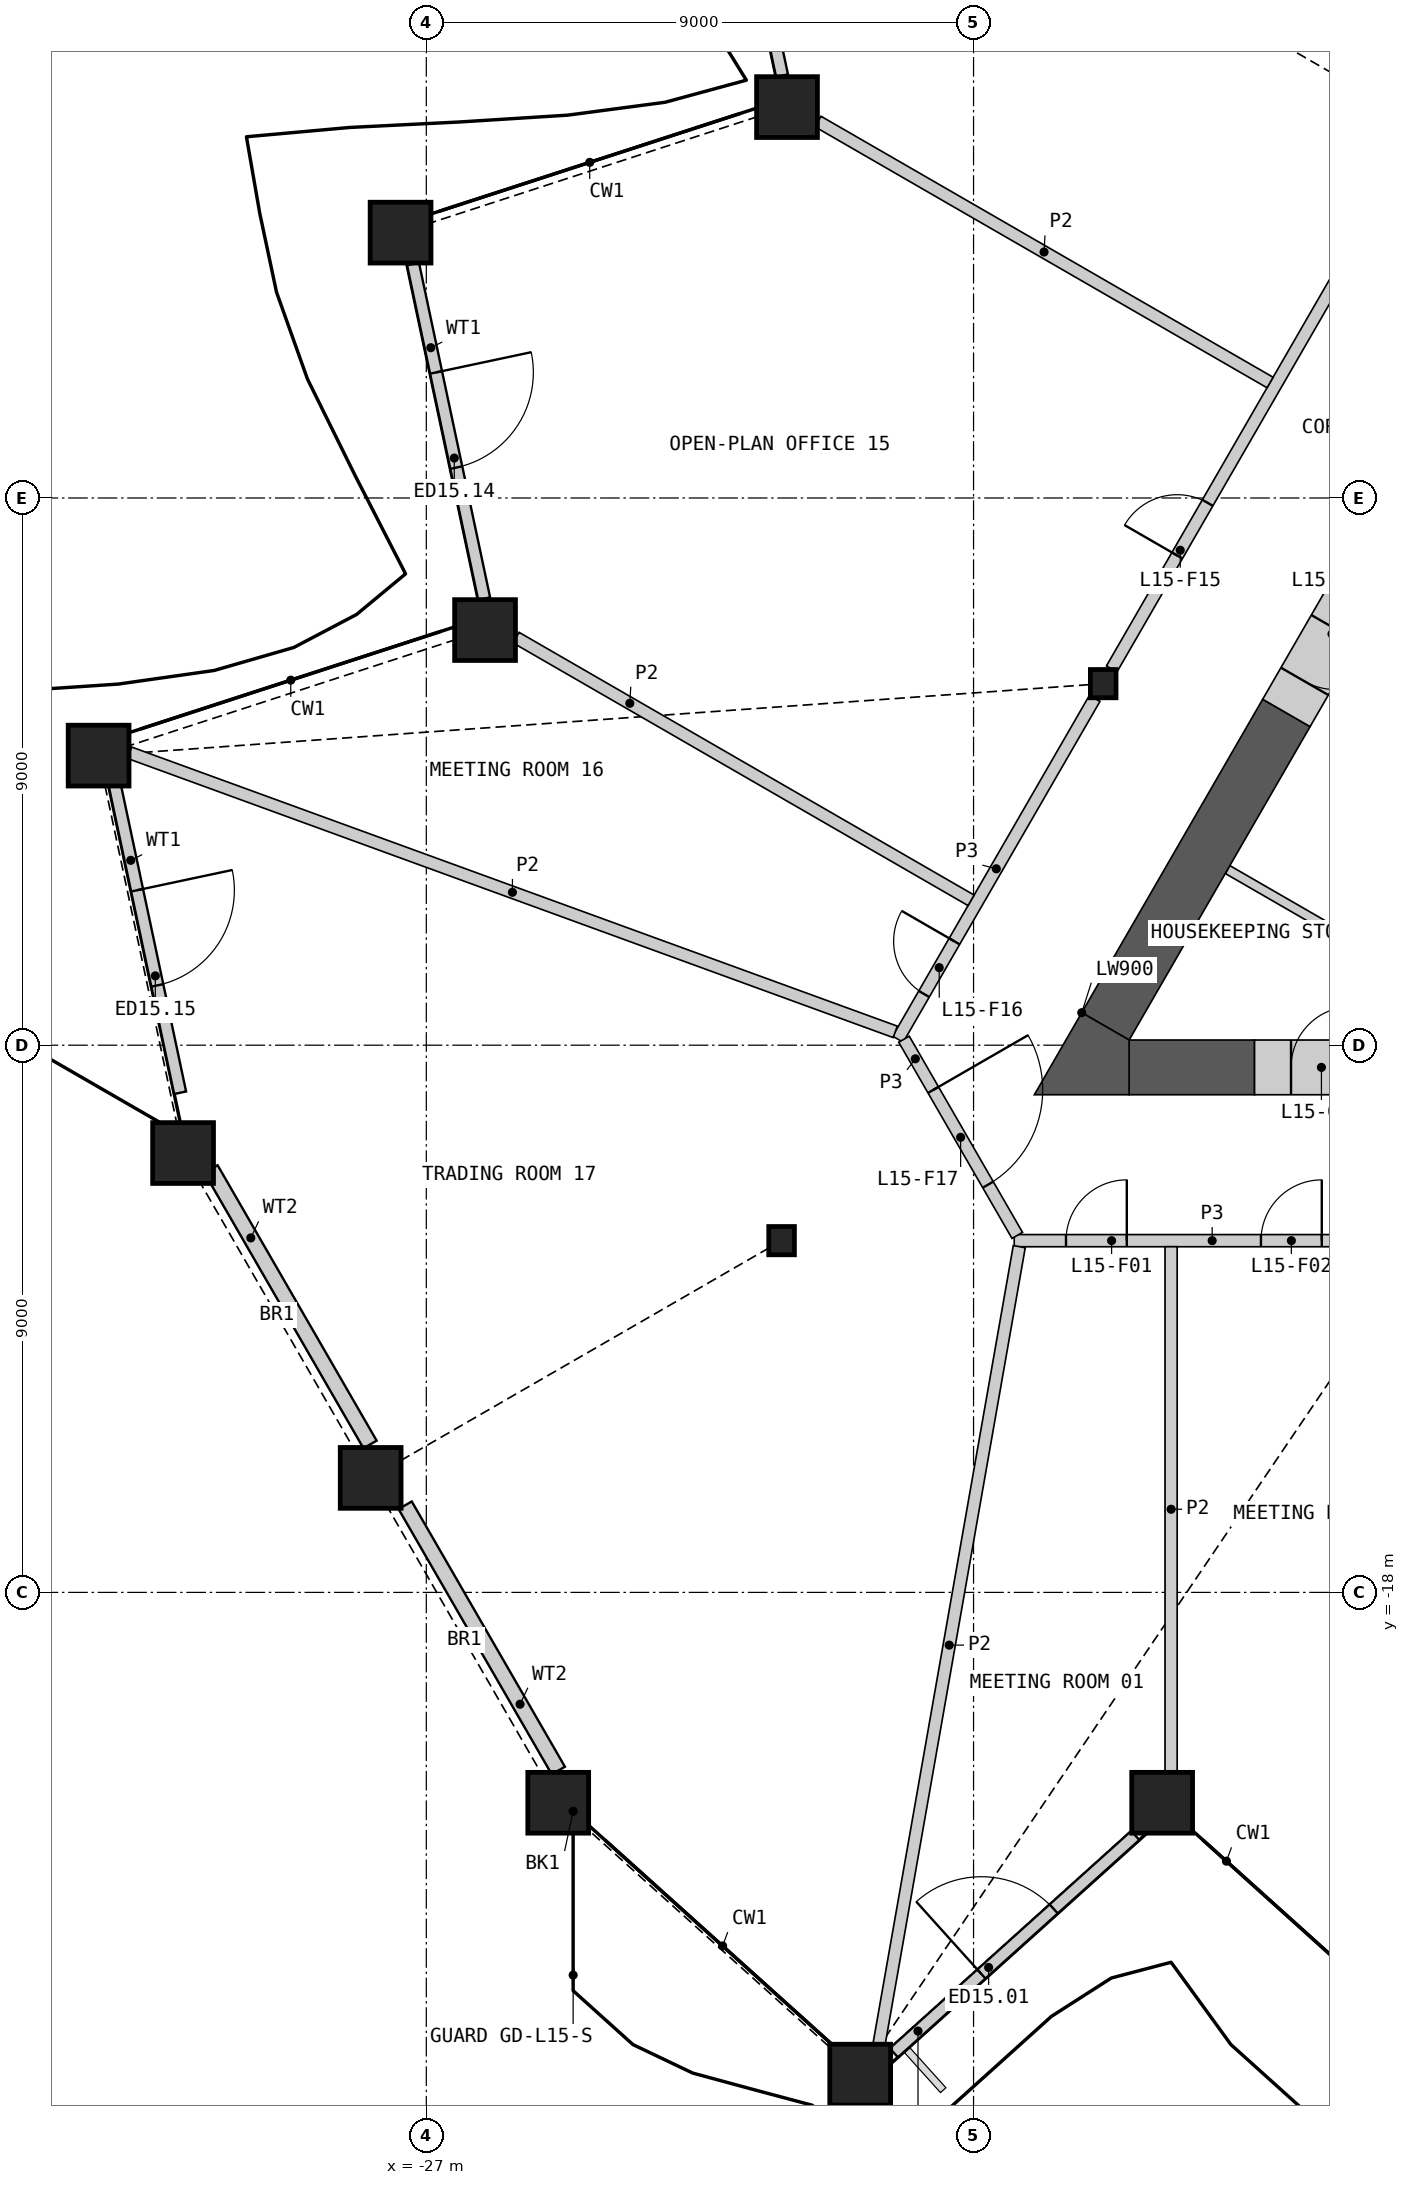
"""IFC4 building model, lengths in metres.
Left out: names, types, materials, properties, quantities, classifications, styles, units other than length and angle.
Written with IfcOpenShell. Run it as: python <this file> out.ifc"""

import sys

from ifc_helpers import new_model, si_unit, direction, frame, frame_2d, origin, origin_2d, place, context, subcontext, project, spatial, polyline, rectangle, hollow_rectangle, i_section, outline, extrude, element, fill, save


model = new_model("IFC4")
c1 = context("Model", 3, precision=1e-05, world=origin(), true_north=direction((0.0, 1.0)))
c2 = subcontext(c1, "Body", "Model", "MODEL_VIEW")
j1 = project(units=[si_unit("LENGTHUNIT", "METRE"), si_unit("PLANEANGLEUNIT", "RADIAN")], contexts=[c1])
p1 = place(None, origin())
s1 = spatial("IfcSite", under=j1, at=p1, CompositionType="ELEMENT")
p2 = place(p1, origin())
s2 = spatial("IfcBuilding", under=s1, at=p2, CompositionType="ELEMENT")
p3 = place(p2, frame((0.0, 0.0, 72.0)))
s3 = spatial("IfcBuildingStorey", under=s2, at=p3, CompositionType="ELEMENT", Elevation=72.0)
for number, where, z_axis, x_axis in (
    (1, (-24.83, -21.46, 0.0), (0.0, 0.0, 1.0), (1.0, 0.0, 0.0)),
    (2, (-19.864, -25.931, 0.0), (0.0, 0.0, 1.0), (1.0, 0.0, 0.0)),
    (3, (-14.898, -21.46, 0.0), (0.0, 0.0, 1.0), (1.0, 0.0, 0.0)),
    (4, (-21.068, 6.429, 0.0), (0.0, 0.0, 1.0), (1.0, 0.0, 0.0)),
    (5, (-27.423, 4.364, 0.0), (0.0, 0.0, 1.0), (1.0, 0.0, 0.0)),
    (6, (-26.034, -2.172, 0.0), (0.0, 0.0, 1.0), (1.0, 0.0, 0.0)),
    (7, (-32.389, -4.237, 0.0), (0.0, 0.0, 1.0), (1.0, 0.0, 0.0)),
    (8, (-31.0, -10.774, 0.0), (0.0, 0.0, 1.0), (1.0, 0.0, 0.0)),
    (9, (-27.915, -16.117, 0.0), (0.0, 0.0, 1.0), (1.0, 0.0, 0.0)),
):
    element("IfcColumn", number, at=place(p3, frame(where, z_axis=z_axis, x_axis=x_axis)), inside=s3, PredefinedType="COLUMN", context=c2, shape_type="SweptSolid", body=[
        extrude(hollow_rectangle(XDim=1.0, YDim=1.0, WallThickness=0.07, at=origin_2d()), origin(), (0.0, 0.0, 1.0), 4.2),
    ])
for number, where, z_axis, x_axis in (
    (10, (-15.868, -3.054, 0.0), (0.0, 0.0, 1.0), (1.0, 0.0, 0.0)),
    (11, (-21.157, -12.215, 0.0), (0.0, 0.0, 1.0), (1.0, 0.0, 0.0)),
):
    element("IfcColumn", number, at=place(p3, frame(where, z_axis=z_axis, x_axis=x_axis)), inside=s3, PredefinedType="COLUMN", context=c2, shape_type="SweptSolid", body=[
        extrude(i_section(OverallWidth=0.421, OverallDepth=0.465, WebThickness=0.045, FlangeThickness=0.072, at=origin_2d()), origin(), (0.0, 0.0, 1.0), 4.2),
    ])
p4 = place(p3, frame((-19.311, -25.573, 0.0), z_axis=(0.0, 0.0, 1.0), x_axis=(0.743150982682, 0.669123768027, 0.0)))
e12 = element("IfcWall", 12, at=p4, inside=s3, PredefinedType="SOLIDWALL", context=c2, shape_type="SweptSolid", body=[
    extrude(rectangle(XDim=5.343, YDim=0.2, at=frame_2d((2.671, 0.0))), origin(), (0.0, 0.0, 1.0), 3.189),
])
p5 = place(p4, frame((1.937, 0.0, 0.0)))
e13 = element("IfcOpeningElement", 13, at=p5, cuts=e12, PredefinedType="OPENING", context=c2, shape_type="SweptSolid", body=[
    extrude(rectangle(XDim=1.6, YDim=2.4, at=frame_2d((0.8, 1.2))), frame((0.0, 0.11, 0.0), z_axis=(0.0, -1.0, 0.0), x_axis=(1.0, 0.0, 0.0)), (0.0, 0.0, 1.0), 0.22),
])
p6 = place(p3, frame((-22.319, 12.449, 0.0), z_axis=(0.0, 0.0, 1.0), x_axis=(0.207901831982, -0.978149696242, 0.0)))
e14 = element("IfcWall", 14, at=p6, inside=s3, PredefinedType="SOLIDWALL", context=c2, shape_type="SweptSolid", body=[
    extrude(rectangle(XDim=5.626, YDim=0.2, at=frame_2d((2.813, 0.0))), origin(), (0.0, 0.0, 1.0), 3.189),
])
p7 = place(p6, frame((1.909, 0.0, 0.0)))
e15 = element("IfcOpeningElement", 15, at=p7, cuts=e14, PredefinedType="OPENING", context=c2, shape_type="SweptSolid", body=[
    extrude(rectangle(XDim=1.6, YDim=2.4, at=frame_2d((0.8, 1.2))), frame((0.0, 0.11, 0.0), z_axis=(0.0, -1.0, 0.0), x_axis=(1.0, 0.0, 0.0)), (0.0, 0.0, 1.0), 0.22),
])
p8 = place(p3, frame((-27.218, 3.848, 0.0), z_axis=(0.0, 0.0, 1.0), x_axis=(0.207943350029, -0.978140870825, 0.0)))
e16 = element("IfcWall", 16, at=p8, inside=s3, PredefinedType="SOLIDWALL", context=c2, shape_type="SweptSolid", body=[
    extrude(rectangle(XDim=5.626, YDim=0.2, at=frame_2d((2.813, 0.0))), origin(), (0.0, 0.0, 1.0), 3.189),
])
p9 = place(p8, frame((1.822, 0.0, 0.0)))
e17 = element("IfcOpeningElement", 17, at=p9, cuts=e16, PredefinedType="OPENING", context=c2, shape_type="SweptSolid", body=[
    extrude(rectangle(XDim=1.6, YDim=2.4, at=frame_2d((0.8, 1.2))), frame((0.0, 0.11, 0.0), z_axis=(0.0, -1.0, 0.0), x_axis=(1.0, 0.0, 0.0)), (0.0, 0.0, 1.0), 0.22),
])
p10 = place(p3, frame((-32.132, -4.686, 0.0), z_axis=(0.0, 0.0, 1.0), x_axis=(0.207896861912, -0.978150752598, 0.0)))
e18 = element("IfcWall", 18, at=p10, inside=s3, PredefinedType="SOLIDWALL", context=c2, shape_type="SweptSolid", body=[
    extrude(rectangle(XDim=5.21, YDim=0.2, at=frame_2d((2.605, 0.0))), origin(), (0.0, 0.0, 1.0), 3.189),
])
p11 = place(p10, frame((1.805, 0.0, 0.0)))
e19 = element("IfcOpeningElement", 19, at=p11, cuts=e18, PredefinedType="OPENING", context=c2, shape_type="SweptSolid", body=[
    extrude(rectangle(XDim=1.6, YDim=2.4, at=frame_2d((0.8, 1.2))), frame((0.0, 0.11, 0.0), z_axis=(0.0, -1.0, 0.0), x_axis=(1.0, 0.0, 0.0)), (0.0, 0.0, 1.0), 0.22),
])
p12 = place(p3, frame((-30.54, -11.037, 0.0), z_axis=(0.0, 0.0, 1.0), x_axis=(0.500009302692, -0.866020032806, 0.0)))
e20 = element("IfcWall", 20, at=p12, inside=s3, PredefinedType="SOLIDWALL", context=c2, shape_type="SweptSolid", body=[
    extrude(rectangle(XDim=5.231, YDim=0.25, at=frame_2d((2.615, 0.0))), origin(), (0.0, 0.0, 1.0), 3.189),
])
p13 = place(p3, frame((-27.348, -16.567, 0.0), z_axis=(0.0, 0.0, 1.0), x_axis=(0.500021659459, -0.866012898329, 0.0)))
e21 = element("IfcWall", 21, at=p13, inside=s3, PredefinedType="SOLIDWALL", context=c2, shape_type="SweptSolid", body=[
    extrude(rectangle(XDim=5.038, YDim=0.25, at=frame_2d((2.519, 0.0))), origin(), (0.0, 0.0, 1.0), 3.189),
])
p14 = place(p3, frame((-13.823, -6.111, 0.0), z_axis=(0.0, 0.0, 1.0), x_axis=(0.866026802741, -0.499997576928, 0.0)))
e22 = element("IfcWall", 22, at=p14, inside=s3, PredefinedType="PARTITIONING", context=c2, shape_type="SweptSolid", body=[
    extrude(rectangle(XDim=5.607, YDim=0.15, at=frame_2d((2.804, 0.0))), origin(), (0.0, 0.0, 1.0), 3.8),
])
p15 = place(p3, frame((-15.441, -9.365, 0.0), z_axis=(0.0, 0.0, 1.0), x_axis=(1.0, 0.0, 0.0)))
e23 = element("IfcWall", 23, at=p15, inside=s3, PredefinedType="SHEAR", context=c2, shape_type="SweptSolid", body=[
    extrude(rectangle(XDim=2.062, YDim=0.9, at=frame_2d((1.031, 0.0))), origin(), (0.0, 0.0, 1.0), 3.8),
])
p16 = place(p3, frame((-12.855, -3.536, 0.0), z_axis=(0.0, 0.0, 1.0), x_axis=(-0.499999419053, -0.866025739194, 0.0)))
e24 = element("IfcWall", 24, at=p16, inside=s3, PredefinedType="SHEAR", context=c2, shape_type="SweptSolid", body=[
    extrude(rectangle(XDim=5.952, YDim=0.9, at=frame_2d((2.976, 0.0))), origin(), (0.0, 0.0, 1.0), 3.8),
])
p17 = place(p3, frame((-10.31, 0.872, 0.0), z_axis=(0.0, 0.0, 1.0), x_axis=(-0.499946751862, -0.866056144429, 0.0)))
e25 = element("IfcWall", 25, at=p17, inside=s3, PredefinedType="SHEAR", context=c2, shape_type="SweptSolid", body=[
    extrude(rectangle(XDim=2.889, YDim=0.9, at=frame_2d((1.445, 0.0))), origin(), (0.0, 0.0, 1.0), 3.8),
])
p18 = place(p3, origin())
e26 = element("IfcWall", 26, at=p18, inside=s3, PredefinedType="SHEAR", context=c2, shape_type="SweptSolid", body=[
    extrude(outline(polyline([(-16.221, -8.465), (-15.441, -8.915), (-15.441, -9.815), (-17.0, -9.815), (-16.221, -8.465)])), origin(), (0.0, 0.0, 1.0), 3.8),
])
p19 = place(p3, frame((-13.379, -9.365, 0.0), z_axis=(0.0, 0.0, 1.0), x_axis=(1.0, 0.0, 0.0)))
e27 = element("IfcWall", 27, at=p19, inside=s3, PredefinedType="SHEAR", context=c2, shape_type="SweptSolid", body=[
    extrude(rectangle(XDim=2.2, YDim=0.9, at=frame_2d((1.1, 0.0))), origin(), (0.0, 0.0, 1.0), 3.8),
])
p20 = place(p19, frame((0.6, 0.0, 0.0)))
e28 = element("IfcOpeningElement", 28, at=p20, cuts=e27, PredefinedType="OPENING", context=c2, shape_type="SweptSolid", body=[
    extrude(rectangle(XDim=1.0, YDim=2.1, at=frame_2d((0.5, 1.05))), frame((0.0, 0.46, 0.0), z_axis=(0.0, -1.0, 0.0), x_axis=(1.0, 0.0, 0.0)), (0.0, 0.0, 1.0), 0.92),
])
p21 = place(p3, frame((-11.755, -1.63, 0.0), z_axis=(0.0, 0.0, 1.0), x_axis=(-0.50002983664, -0.866008176907, 0.0)))
e29 = element("IfcWall", 29, at=p21, inside=s3, PredefinedType="SHEAR", context=c2, shape_type="SweptSolid", body=[
    extrude(rectangle(XDim=2.2, YDim=0.9, at=frame_2d((1.1, 0.0))), origin(), (0.0, 0.0, 1.0), 3.8),
])
p22 = place(p21, frame((0.6, 0.0, 0.0)))
e30 = element("IfcOpeningElement", 30, at=p22, cuts=e29, PredefinedType="OPENING", context=c2, shape_type="SweptSolid", body=[
    extrude(rectangle(XDim=1.0, YDim=2.1, at=frame_2d((0.5, 1.05))), frame((0.0, 0.46, 0.0), z_axis=(0.0, -1.0, 0.0), x_axis=(1.0, 0.0, 0.0)), (0.0, 0.0, 1.0), 0.92),
])
p23 = place(p3, frame((-15.728, -2.811, 0.0), z_axis=(0.0, 0.0, 1.0), x_axis=(0.49999175339, 0.866030164915, 0.0)))
e31 = element("IfcWall", 31, at=p23, inside=s3, PredefinedType="PARTITIONING", context=c2, shape_type="SweptSolid", body=[
    extrude(rectangle(XDim=10.019, YDim=0.2, at=frame_2d((5.009, 0.0))), origin(), (0.0, 0.0, 1.0), 3.8),
])
p24 = place(p23, frame((2.154, 0.0, 0.0)))
e32 = element("IfcOpeningElement", 32, at=p24, cuts=e31, PredefinedType="OPENING", context=c2, shape_type="SweptSolid", body=[
    extrude(rectangle(XDim=1.0, YDim=2.1, at=frame_2d((0.5, 1.05))), frame((0.0, 0.11, 0.0), z_axis=(0.0, -1.0, 0.0), x_axis=(1.0, 0.0, 0.0)), (0.0, 0.0, 1.0), 0.22),
])
p25 = place(p3, frame((-17.331, -12.215, 0.0), z_axis=(0.0, 0.0, 1.0), x_axis=(1.0, 0.0, 0.0)))
e33 = element("IfcWall", 33, at=p25, inside=s3, PredefinedType="PARTITIONING", context=c2, shape_type="SweptSolid", body=[
    extrude(rectangle(XDim=6.51, YDim=0.2, at=frame_2d((3.255, 0.0))), origin(), (0.0, 0.0, 1.0), 3.8),
])
p26 = place(p25, frame((0.851, 0.0, 0.0)))
e34 = element("IfcOpeningElement", 34, at=p26, cuts=e33, PredefinedType="OPENING", context=c2, shape_type="SweptSolid", body=[
    extrude(rectangle(XDim=1.0, YDim=2.1, at=frame_2d((0.5, 1.05))), frame((0.0, 0.11, 0.0), z_axis=(0.0, -1.0, 0.0), x_axis=(1.0, 0.0, 0.0)), (0.0, 0.0, 1.0), 0.22),
])
p27 = place(p25, frame((4.058, 0.0, 0.0)))
e35 = element("IfcOpeningElement", 35, at=p27, cuts=e33, PredefinedType="OPENING", context=c2, shape_type="SweptSolid", body=[
    extrude(rectangle(XDim=1.0, YDim=2.1, at=frame_2d((0.5, 1.05))), frame((0.0, 0.11, 0.0), z_axis=(0.0, -1.0, 0.0), x_axis=(1.0, 0.0, 0.0)), (0.0, 0.0, 1.0), 0.22),
])
p28 = place(p3, frame((-19.244, -8.902, 0.0), z_axis=(0.0, 0.0, 1.0), x_axis=(0.499984737558, 0.86603421538, 0.0)))
e36 = element("IfcWall", 36, at=p28, inside=s3, PredefinedType="PARTITIONING", context=c2, shape_type="SweptSolid", body=[
    extrude(rectangle(XDim=6.473, YDim=0.2, at=frame_2d((3.236, 0.0))), origin(), (0.0, 0.0, 1.0), 3.8),
])
p29 = place(p28, frame((0.859, 0.0, 0.0)))
e37 = element("IfcOpeningElement", 37, at=p29, cuts=e36, PredefinedType="OPENING", context=c2, shape_type="SweptSolid", body=[
    extrude(rectangle(XDim=1.0, YDim=2.1, at=frame_2d((0.5, 1.05))), frame((0.0, 0.11, 0.0), z_axis=(0.0, -1.0, 0.0), x_axis=(1.0, 0.0, 0.0)), (0.0, 0.0, 1.0), 0.22),
])
p30 = place(p3, frame((-19.144, -8.902, 0.0), z_axis=(0.0, 0.0, 1.0), x_axis=(0.499958791762, -0.866049194065, 0.0)))
e38 = element("IfcWall", 38, at=p30, inside=s3, PredefinedType="PARTITIONING", context=c2, shape_type="SweptSolid", body=[
    extrude(rectangle(XDim=3.726, YDim=0.2, at=frame_2d((1.863, 0.0))), origin(), (0.0, 0.0, 1.0), 3.8),
])
p31 = place(p30, frame((0.963, 0.0, 0.0)))
e39 = element("IfcOpeningElement", 39, at=p31, cuts=e38, PredefinedType="OPENING", context=c2, shape_type="SweptSolid", body=[
    extrude(rectangle(XDim=1.8, YDim=2.1, at=frame_2d((0.9, 1.05))), frame((0.0, 0.11, 0.0), z_axis=(0.0, -1.0, 0.0), x_axis=(1.0, 0.0, 0.0)), (0.0, 0.0, 1.0), 0.22),
])
p32 = place(p3, frame((-31.879, -4.19, 0.0), z_axis=(0.0, 0.0, 1.0), x_axis=(0.939515478087, -0.34250644729, 0.0)))
e40 = element("IfcWall", 40, at=p32, inside=s3, PredefinedType="PARTITIONING", context=c2, shape_type="SweptSolid", body=[
    extrude(rectangle(XDim=13.402, YDim=0.2, at=frame_2d((6.701, 0.0))), origin(), (0.0, 0.0, 1.0), 2.885),
])
p33 = place(p3, frame((-19.552, -25.421, 0.0), z_axis=(0.0, 0.0, 1.0), x_axis=(0.173132292437, 0.984898578187, 0.0)))
e41 = element("IfcWall", 41, at=p33, inside=s3, PredefinedType="PARTITIONING", context=c2, shape_type="SweptSolid", body=[
    extrude(rectangle(XDim=13.309, YDim=0.2, at=frame_2d((6.654, 0.0))), origin(), (0.0, 0.0, 1.0), 2.885),
])
p34 = place(p3, frame((-25.524, -2.297, 0.0), z_axis=(0.0, 0.0, 1.0), x_axis=(0.866036909293, -0.499980071345, 0.0)))
e42 = element("IfcWall", 42, at=p34, inside=s3, PredefinedType="PARTITIONING", context=c2, shape_type="SweptSolid", body=[
    extrude(rectangle(XDim=8.641, YDim=0.2, at=frame_2d((4.32, 0.0))), origin(), (0.0, 0.0, 1.0), 2.885),
])
p35 = place(p3, frame((-14.751, -20.95, 0.0), z_axis=(0.0, 0.0, 1.0), x_axis=(0.0, 1.0, 0.0)))
e43 = element("IfcWall", 43, at=p35, inside=s3, PredefinedType="PARTITIONING", context=c2, shape_type="SweptSolid", body=[
    extrude(rectangle(XDim=8.635, YDim=0.2, at=frame_2d((4.317, 0.0))), origin(), (0.0, 0.0, 1.0), 2.885),
])
p36 = place(p3, frame((-20.558, 6.191, 0.0), z_axis=(0.0, 0.0, 1.0), x_axis=(0.866024086673, -0.500002281298, 0.0)))
e44 = element("IfcWall", 44, at=p36, inside=s3, PredefinedType="PARTITIONING", context=c2, shape_type="SweptSolid", body=[
    extrude(rectangle(XDim=8.584, YDim=0.2, at=frame_2d((4.292, 0.0))), origin(), (0.0, 0.0, 1.0), 2.885),
])
p37 = place(p5, origin())
e45 = element("IfcDoor", 45, at=p37, inside=s3, OperationType="DOUBLE_DOOR_SINGLE_SWING", PredefinedType="DOOR", context=c2, shape_type="SweptSolid", body=[
    extrude(rectangle(XDim=1.6, YDim=2.4, at=frame_2d((0.8, 1.2))), frame((0.0, 0.025, 0.0), z_axis=(0.0, -1.0, 0.0), x_axis=(1.0, 0.0, 0.0)), (0.0, 0.0, 1.0), 0.05),
])
fill(e13, e45)
p38 = place(p9, origin())
e46 = element("IfcDoor", 46, at=p38, inside=s3, OperationType="DOUBLE_DOOR_SINGLE_SWING", PredefinedType="DOOR", context=c2, shape_type="SweptSolid", body=[
    extrude(rectangle(XDim=1.6, YDim=2.4, at=frame_2d((0.8, 1.2))), frame((0.0, 0.025, 0.0), z_axis=(0.0, -1.0, 0.0), x_axis=(1.0, 0.0, 0.0)), (0.0, 0.0, 1.0), 0.05),
])
fill(e17, e46)
p39 = place(p11, origin())
e47 = element("IfcDoor", 47, at=p39, inside=s3, OperationType="DOUBLE_DOOR_SINGLE_SWING", PredefinedType="DOOR", context=c2, shape_type="SweptSolid", body=[
    extrude(rectangle(XDim=1.6, YDim=2.4, at=frame_2d((0.8, 1.2))), frame((0.0, 0.025, 0.0), z_axis=(0.0, -1.0, 0.0), x_axis=(1.0, 0.0, 0.0)), (0.0, 0.0, 1.0), 0.05),
])
fill(e19, e47)
p40 = place(p20, origin())
e48 = element("IfcDoor", 48, at=p40, inside=s3, OperationType="SINGLE_SWING_RIGHT", PredefinedType="DOOR", context=c2, shape_type="SweptSolid", body=[
    extrude(rectangle(XDim=1.0, YDim=2.1, at=frame_2d((0.5, 1.05))), frame((0.0, 0.205, 0.0), z_axis=(0.0, -1.0, 0.0), x_axis=(1.0, 0.0, 0.0)), (0.0, 0.0, 1.0), 0.05),
])
fill(e28, e48)
p41 = place(p22, origin())
e49 = element("IfcDoor", 49, at=p41, inside=s3, OperationType="SINGLE_SWING_LEFT", PredefinedType="DOOR", context=c2, shape_type="SweptSolid", body=[
    extrude(rectangle(XDim=1.0, YDim=2.1, at=frame_2d((0.5, 1.05))), frame((0.0, 0.205, 0.0), z_axis=(0.0, -1.0, 0.0), x_axis=(1.0, 0.0, 0.0)), (0.0, 0.0, 1.0), 0.05),
])
fill(e30, e49)
p42 = place(p26, origin())
e50 = element("IfcDoor", 50, at=p42, inside=s3, OperationType="SINGLE_SWING_RIGHT", PredefinedType="DOOR", context=c2, shape_type="SweptSolid", body=[
    extrude(rectangle(XDim=1.0, YDim=2.1, at=frame_2d((0.5, 1.05))), frame((0.0, 0.025, 0.0), z_axis=(0.0, -1.0, 0.0), x_axis=(1.0, 0.0, 0.0)), (0.0, 0.0, 1.0), 0.05),
])
fill(e34, e50)
p43 = place(p27, origin())
e51 = element("IfcDoor", 51, at=p43, inside=s3, OperationType="SINGLE_SWING_RIGHT", PredefinedType="DOOR", context=c2, shape_type="SweptSolid", body=[
    extrude(rectangle(XDim=1.0, YDim=2.1, at=frame_2d((0.5, 1.05))), frame((0.0, 0.025, 0.0), z_axis=(0.0, -1.0, 0.0), x_axis=(1.0, 0.0, 0.0)), (0.0, 0.0, 1.0), 0.05),
])
fill(e35, e51)
p44 = place(p24, origin())
e52 = element("IfcDoor", 52, at=p44, inside=s3, OperationType="SINGLE_SWING_LEFT", PredefinedType="DOOR", context=c2, shape_type="SweptSolid", body=[
    extrude(rectangle(XDim=1.0, YDim=2.1, at=frame_2d((0.5, 1.05))), frame((0.0, 0.025, 0.0), z_axis=(0.0, -1.0, 0.0), x_axis=(1.0, 0.0, 0.0)), (0.0, 0.0, 1.0), 0.05),
])
fill(e32, e52)
p45 = place(p29, origin())
e53 = element("IfcDoor", 53, at=p45, inside=s3, OperationType="SINGLE_SWING_RIGHT", PredefinedType="DOOR", context=c2, shape_type="SweptSolid", body=[
    extrude(rectangle(XDim=1.0, YDim=2.1, at=frame_2d((0.5, 1.05))), frame((0.0, 0.025, 0.0), z_axis=(0.0, -1.0, 0.0), x_axis=(1.0, 0.0, 0.0)), (0.0, 0.0, 1.0), 0.05),
])
fill(e37, e53)
p46 = place(p31, origin())
e54 = element("IfcDoor", 54, at=p46, inside=s3, OperationType="DOUBLE_DOOR_SINGLE_SWING", PredefinedType="DOOR", context=c2, shape_type="SweptSolid", body=[
    extrude(rectangle(XDim=1.8, YDim=2.1, at=frame_2d((0.9, 1.05))), frame((0.0, 0.025, 0.0), z_axis=(0.0, -1.0, 0.0), x_axis=(1.0, 0.0, 0.0)), (0.0, 0.0, 1.0), 0.05),
])
fill(e39, e54)
save(model, sys.argv[1])
